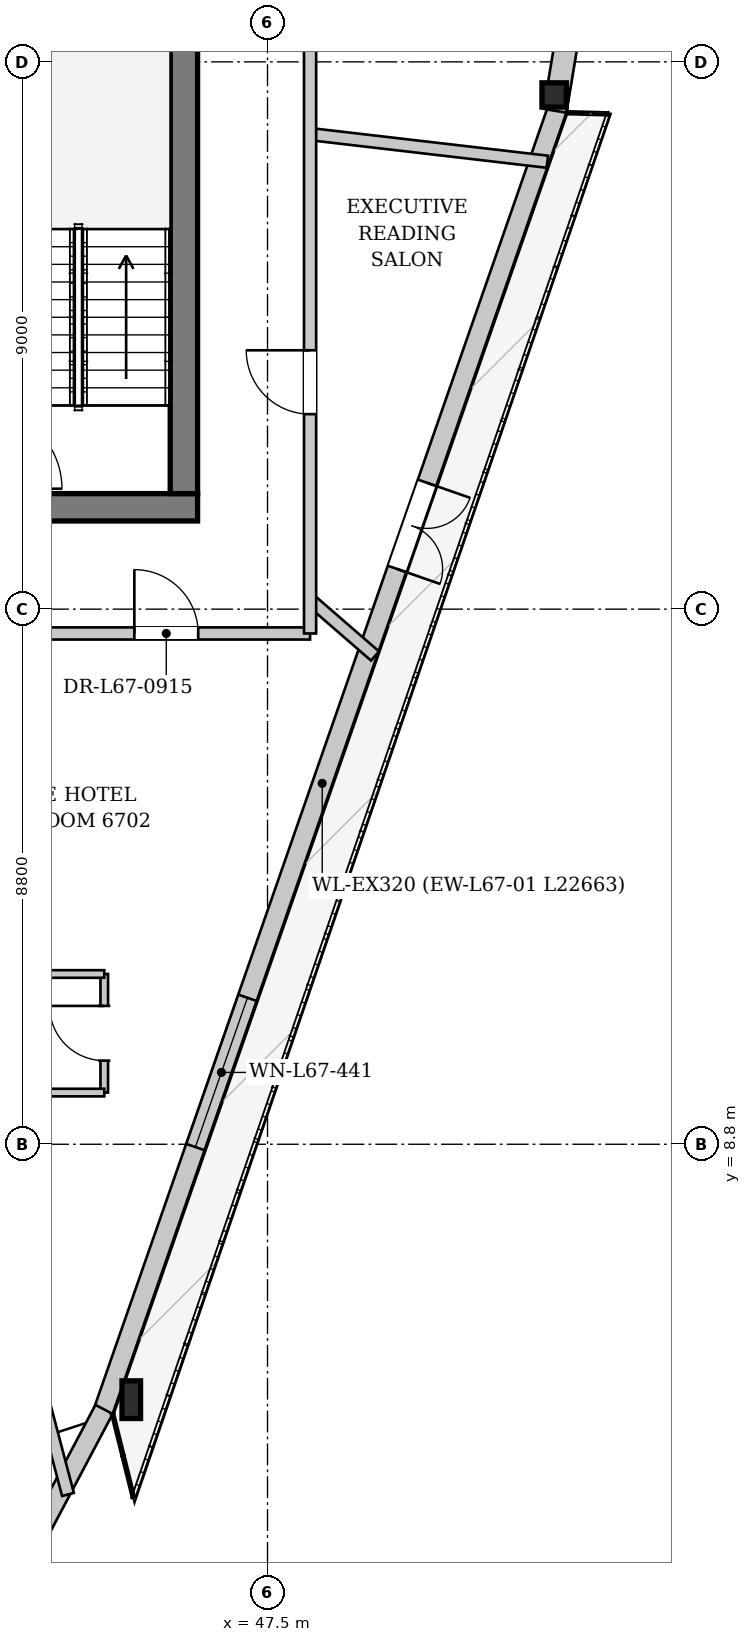
"""IFC4 building model, lengths in metres.
Left out: names, types, materials, properties, quantities, classifications, styles, units other than length and angle.
Written with IfcOpenShell. Run it as: python <this file> out.ifc"""

import sys

from ifc_helpers import new_model, si_unit, direction, frame, frame_2d, origin, origin_2d, place, context, subcontext, project, spatial, rectangle, i_section, extrude, source, transform, mapped, element, fill, save


model = new_model("IFC4")
c1 = context("Model", 3, precision=1e-05, world=origin(), true_north=direction((0.0, 1.0)))
c2 = subcontext(c1, "Body", "Model", "MODEL_VIEW")
j1 = project(units=[si_unit("LENGTHUNIT", "METRE"), si_unit("PLANEANGLEUNIT", "RADIAN")], contexts=[c1])
p1 = place(None, origin())
s1 = spatial("IfcSite", under=j1, at=p1, CompositionType="ELEMENT")
p2 = place(p1, origin())
s2 = spatial("IfcBuilding", under=s1, at=p2, CompositionType="ELEMENT")
p3 = place(p2, frame((0.0, 0.0, 252.5)))
s3 = spatial("IfcBuildingStorey", under=s2, at=p3, CompositionType="ELEMENT", Elevation=252.5)
m1 = source(origin(), c2, "Body", "SweptSolid", [
    extrude(i_section(OverallWidth=0.305, OverallDepth=0.62, WebThickness=0.021, FlangeThickness=0.04, at=origin_2d()), origin(), (0.0, 0.0, 1.0), 3.521),
])
p4 = place(p3, frame((44.953, 4.365, 0.0), z_axis=(0.174187178706, 0.133344723189, 0.975642358435), x_axis=(-0.607860680587, 0.794043697158, 0.0)))
e1 = element("IfcColumn", 1, at=p4, inside=s3, PredefinedType="COLUMN", context=c2, shape_type="MappedRepresentation", body=[
    mapped(m1, transform((0.0, 0.0, 0.0), x_axis=(1.0, 0.0, 0.0), y_axis=(0.0, 1.0, 0.0), z_axis=(0.0, 0.0, 1.0), scale=1.0)),
])
m2 = source(origin(), c2, "Body", "SweptSolid", [
    extrude(i_section(OverallWidth=0.401, OverallDepth=0.399, WebThickness=0.022, FlangeThickness=0.034, at=origin_2d()), origin(), (0.0, 0.0, 1.0), 3.507),
])
p5 = place(p3, frame((52.416, 25.764, 0.0), z_axis=(-0.11464621978, 0.166226577313, 0.97940031105), x_axis=(-0.823196118905, -0.56775712221, 0.0)))
e2 = element("IfcColumn", 2, at=p5, inside=s3, PredefinedType="COLUMN", context=c2, shape_type="MappedRepresentation", body=[
    mapped(m2, transform((0.0, 0.0, 0.0), x_axis=(1.0, 0.0, 0.0), y_axis=(0.0, 1.0, 0.0), z_axis=(0.0, 0.0, 1.0), scale=1.0)),
])
p6 = place(p3, frame((52.264, 25.817, 0.0), z_axis=(0.0, 0.0, 1.0), x_axis=(-0.329283040193, -0.944231263749, 0.0)))
e3 = element("IfcWall", 3, at=p6, inside=s3, PredefinedType="SOLIDWALL", context=c2, shape_type="SweptSolid", body=[
    extrude(rectangle(XDim=22.663, YDim=0.32, at=frame_2d((11.332, 0.0))), origin(), (0.0, 0.0, 1.0), 2.872),
])
p7 = place(p6, frame((6.502, 0.0, 0.0)))
e4 = element("IfcOpeningElement", 4, at=p7, cuts=e3, PredefinedType="OPENING", context=c2, shape_type="SweptSolid", body=[
    extrude(rectangle(XDim=1.5, YDim=2.3, at=frame_2d((0.75, 1.15))), frame((0.0, 0.17, 0.0), z_axis=(0.0, -1.0, 0.0), x_axis=(1.0, 0.0, 0.0)), (0.0, 0.0, 1.0), 0.34),
])
p8 = place(p6, frame((15.471, 0.0, 0.402)))
e5 = element("IfcOpeningElement", 5, at=p8, cuts=e3, PredefinedType="OPENING", context=c2, shape_type="SweptSolid", body=[
    extrude(rectangle(XDim=2.6, YDim=2.35, at=frame_2d((1.3, 1.175))), frame((0.0, 0.17, 0.0), z_axis=(0.0, -1.0, 0.0), x_axis=(1.0, 0.0, 0.0)), (0.0, 0.0, 1.0), 0.34),
])
p9 = place(p3, frame((44.812, 4.44, 0.0), z_axis=(0.0, 0.0, 1.0), x_axis=(-0.467628956956, -0.883924860277, 0.0)))
e6 = element("IfcWall", 6, at=p9, inside=s3, PredefinedType="SOLIDWALL", context=c2, shape_type="SweptSolid", body=[
    extrude(rectangle(XDim=3.382, YDim=0.32, at=frame_2d((1.691, 0.0))), origin(), (0.0, 0.0, 1.0), 2.872),
])
p10 = place(p3, frame((55.959, 48.15, 0.0), z_axis=(0.0, 0.0, 1.0), x_axis=(-0.164634811141, -0.986354590885, 0.0)))
e7 = element("IfcWall", 7, at=p10, inside=s3, PredefinedType="SOLIDWALL", context=c2, shape_type="SweptSolid", body=[
    extrude(rectangle(XDim=22.664, YDim=0.38, at=frame_2d((11.332, 0.0))), origin(), (0.0, 0.0, 1.0), 2.872),
])
p11 = place(p10, frame((5.746, 0.0, 0.65)))
e8 = element("IfcOpeningElement", 8, at=p11, cuts=e7, PredefinedType="OPENING", context=c2, shape_type="SweptSolid", body=[
    extrude(rectangle(XDim=1.2, YDim=1.5, at=frame_2d((0.6, 0.75))), frame((0.0, 0.2, 0.0), z_axis=(0.0, -1.0, 0.0), x_axis=(1.0, 0.0, 0.0)), (0.0, 0.0, 1.0), 0.4),
])
p12 = place(p10, frame((15.718, 0.0, 0.65)))
e9 = element("IfcOpeningElement", 9, at=p12, cuts=e7, PredefinedType="OPENING", context=c2, shape_type="SweptSolid", body=[
    extrude(rectangle(XDim=1.2, YDim=1.5, at=frame_2d((0.6, 0.75))), frame((0.0, 0.2, 0.0), z_axis=(0.0, -1.0, 0.0), x_axis=(1.0, 0.0, 0.0)), (0.0, 0.0, 1.0), 0.4),
])
p13 = place(p3, frame((46.35, 19.275, 0.0), z_axis=(0.0, 0.0, 1.0), x_axis=(-1.0, 0.0, 0.0)))
e10 = element("IfcWall", 10, at=p13, inside=s3, PredefinedType="SHEAR", context=c2, shape_type="SweptSolid", body=[
    extrude(rectangle(XDim=16.7, YDim=0.45, at=frame_2d((8.35, 0.0))), origin(), (0.0, 0.0, 1.0), 3.38),
])
p14 = place(p13, frame((4.55, 0.0, 0.0)))
e11 = element("IfcOpeningElement", 11, at=p14, cuts=e10, PredefinedType="OPENING", context=c2, shape_type="SweptSolid", body=[
    extrude(rectangle(XDim=1.12, YDim=2.25, at=frame_2d((0.56, 1.125))), frame((0.0, 0.235, 0.0), z_axis=(0.0, -1.0, 0.0), x_axis=(1.0, 0.0, 0.0)), (0.0, 0.0, 1.0), 0.47),
])
p15 = place(p13, frame((11.05, 0.0, 0.0)))
e12 = element("IfcOpeningElement", 12, at=p15, cuts=e10, PredefinedType="OPENING", context=c2, shape_type="SweptSolid", body=[
    extrude(rectangle(XDim=1.12, YDim=2.25, at=frame_2d((0.56, 1.125))), frame((0.0, 0.235, 0.0), z_axis=(0.0, -1.0, 0.0), x_axis=(1.0, 0.0, 0.0)), (0.0, 0.0, 1.0), 0.47),
])
p16 = place(p3, frame((46.125, 33.7, 0.0), z_axis=(0.0, 0.0, 1.0), x_axis=(0.0, -1.0, 0.0)))
e13 = element("IfcWall", 13, at=p16, inside=s3, PredefinedType="SHEAR", context=c2, shape_type="SweptSolid", body=[
    extrude(rectangle(XDim=14.2, YDim=0.45, at=frame_2d((7.1, 0.0))), origin(), (0.0, 0.0, 1.0), 3.38),
])
p17 = place(p16, frame((5.18, 0.0, 0.0)))
e14 = element("IfcOpeningElement", 14, at=p17, cuts=e13, PredefinedType="OPENING", context=c2, shape_type="SweptSolid", body=[
    extrude(rectangle(XDim=1.6, YDim=2.2, at=frame_2d((0.8, 1.1))), frame((0.0, 0.235, 0.0), z_axis=(0.0, -1.0, 0.0), x_axis=(1.0, 0.0, 0.0)), (0.0, 0.0, 1.0), 0.47),
])
p18 = place(p16, frame((2.05, 0.0, 0.0)))
e15 = element("IfcOpeningElement", 15, at=p18, cuts=e13, PredefinedType="OPENING", context=c2, shape_type="SweptSolid", body=[
    extrude(rectangle(XDim=0.95, YDim=2.1, at=frame_2d((0.475, 1.05))), frame((0.0, 0.235, 0.0), z_axis=(0.0, -1.0, 0.0), x_axis=(1.0, 0.0, 0.0)), (0.0, 0.0, 1.0), 0.47),
])
p19 = place(p3, frame((40.481, 17.2, 0.0), z_axis=(0.0, 0.0, 1.0), x_axis=(0.255204698794, -0.96688704703, 0.0)))
e16 = element("IfcWall", 16, at=p19, inside=s3, PredefinedType="PARTITIONING", context=c2, shape_type="SweptSolid", body=[
    extrude(rectangle(XDim=14.644, YDim=0.2, at=frame_2d((7.322, 0.0))), origin(), (0.0, 0.0, 1.0), 3.38),
])
p20 = place(p3, frame((48.2, 17.756, 0.0), z_axis=(0.0, 0.0, 1.0), x_axis=(0.755500982585, -0.655147514162, 0.0)))
e17 = element("IfcWall", 17, at=p20, inside=s3, PredefinedType="PARTITIONING", context=c2, shape_type="SweptSolid", body=[
    extrude(rectangle(XDim=1.414, YDim=0.2, at=frame_2d((0.707, 0.0))), origin(), (0.0, 0.0, 1.0), 3.38),
])
p21 = place(p3, frame((48.2, 25.412, 0.0), z_axis=(0.0, 0.0, 1.0), x_axis=(0.993283151491, -0.115709035791, 0.0)))
e18 = element("IfcWall", 18, at=p21, inside=s3, PredefinedType="PARTITIONING", context=c2, shape_type="SweptSolid", body=[
    extrude(rectangle(XDim=3.929, YDim=0.2, at=frame_2d((1.964, 0.0))), origin(), (0.0, 0.0, 1.0), 3.38),
])
p22 = place(p3, frame((44.815, 9.65, 0.0), z_axis=(0.0, 0.0, 1.0), x_axis=(0.0, 1.0, 0.0)))
e19 = element("IfcWall", 19, at=p22, inside=s3, PredefinedType="PARTITIONING", context=c2, shape_type="SweptSolid", body=[
    extrude(rectangle(XDim=1.95, YDim=0.125, at=frame_2d((0.975, 0.0))), origin(), (0.0, 0.0, 1.0), 3.38),
])
p23 = place(p22, frame((0.525, 0.0, 0.0)))
e20 = element("IfcOpeningElement", 20, at=p23, cuts=e19, PredefinedType="OPENING", context=c2, shape_type="SweptSolid", body=[
    extrude(rectangle(XDim=0.9, YDim=2.1, at=frame_2d((0.45, 1.05))), frame((0.0, 0.073, 0.0), z_axis=(0.0, -1.0, 0.0), x_axis=(1.0, 0.0, 0.0)), (0.0, 0.0, 1.0), 0.145),
])
for number, where, z_axis, x_axis in (
    (21, (44.815, 11.6, 0.0), (0.0, 0.0, 1.0), (-1.0, 0.0, 0.0)),
    (22, (42.715, 9.65, 0.0), (0.0, 0.0, 1.0), (1.0, 0.0, 0.0)),
):
    element("IfcWall", number, at=place(p3, frame(where, z_axis=z_axis, x_axis=x_axis)), inside=s3, PredefinedType="PARTITIONING", context=c2, shape_type="SweptSolid", body=[
        extrude(rectangle(XDim=2.1, YDim=0.125, at=frame_2d((1.05, 0.0))), origin(), (0.0, 0.0, 1.0), 3.38),
    ])
p24 = place(p3, frame((27.8, 17.2, 0.0), z_axis=(0.0, 0.0, 1.0), x_axis=(1.0, 0.0, 0.0)))
e23 = element("IfcWall", 23, at=p24, inside=s3, PredefinedType="PARTITIONING", context=c2, shape_type="SweptSolid", body=[
    extrude(rectangle(XDim=20.4, YDim=0.2, at=frame_2d((10.2, 0.0))), origin(), (0.0, 0.0, 1.0), 3.38),
])
p25 = place(p24, frame((9.356, 0.0, 0.0)))
e24 = element("IfcOpeningElement", 24, at=p25, cuts=e23, PredefinedType="OPENING", context=c2, shape_type="SweptSolid", body=[
    extrude(rectangle(XDim=1.05, YDim=2.2, at=frame_2d((0.525, 1.1))), frame((0.0, 0.11, 0.0), z_axis=(0.0, -1.0, 0.0), x_axis=(1.0, 0.0, 0.0)), (0.0, 0.0, 1.0), 0.22),
])
p26 = place(p24, frame((17.51, 0.0, 0.0)))
e25 = element("IfcOpeningElement", 25, at=p26, cuts=e23, PredefinedType="OPENING", context=c2, shape_type="SweptSolid", body=[
    extrude(rectangle(XDim=1.05, YDim=2.2, at=frame_2d((0.525, 1.1))), frame((0.0, 0.11, 0.0), z_axis=(0.0, -1.0, 0.0), x_axis=(1.0, 0.0, 0.0)), (0.0, 0.0, 1.0), 0.22),
])
p27 = place(p24, frame((0.412, 0.0, 0.0)))
e26 = element("IfcOpeningElement", 26, at=p27, cuts=e23, PredefinedType="OPENING", context=c2, shape_type="SweptSolid", body=[
    extrude(rectangle(XDim=1.05, YDim=2.2, at=frame_2d((0.525, 1.1))), frame((0.0, 0.11, 0.0), z_axis=(0.0, -1.0, 0.0), x_axis=(1.0, 0.0, 0.0)), (0.0, 0.0, 1.0), 0.22),
])
p28 = place(p3, frame((48.2, 17.2, 0.0), z_axis=(0.0, 0.0, 1.0), x_axis=(0.0, 1.0, 0.0)))
e27 = element("IfcWall", 27, at=p28, inside=s3, PredefinedType="PARTITIONING", context=c2, shape_type="SweptSolid", body=[
    extrude(rectangle(XDim=18.8, YDim=0.2, at=frame_2d((9.4, 0.0))), origin(), (0.0, 0.0, 1.0), 3.065),
])
p29 = place(p28, frame((3.607, 0.0, 0.0)))
e28 = element("IfcOpeningElement", 28, at=p29, cuts=e27, PredefinedType="OPENING", context=c2, shape_type="SweptSolid", body=[
    extrude(rectangle(XDim=1.05, YDim=2.2, at=frame_2d((0.525, 1.1))), frame((0.0, 0.11, 0.0), z_axis=(0.0, -1.0, 0.0), x_axis=(1.0, 0.0, 0.0)), (0.0, 0.0, 1.0), 0.22),
])
p30 = place(p28, frame((10.359, 0.0, 0.0)))
e29 = element("IfcOpeningElement", 29, at=p30, cuts=e27, PredefinedType="OPENING", context=c2, shape_type="SweptSolid", body=[
    extrude(rectangle(XDim=1.05, YDim=2.2, at=frame_2d((0.525, 1.1))), frame((0.0, 0.11, 0.0), z_axis=(0.0, -1.0, 0.0), x_axis=(1.0, 0.0, 0.0)), (0.0, 0.0, 1.0), 0.22),
])
m3 = source(origin(), c2, "Body", "SweptSolid", [
    extrude(rectangle(XDim=1.5, YDim=2.3, at=frame_2d((0.75, 1.15))), frame((0.0, 0.025, 0.0), z_axis=(0.0, -1.0, 0.0), x_axis=(1.0, 0.0, 0.0)), (0.0, 0.0, 1.0), 0.05),
])
p31 = place(p7, origin())
e30 = element("IfcDoor", 30, at=p31, inside=s3, OperationType="DOUBLE_DOOR_SINGLE_SWING", PredefinedType="DOOR", context=c2, shape_type="MappedRepresentation", body=[
    mapped(m3, transform((0.0, 0.0, 0.0), x_axis=(1.0, 0.0, 0.0), y_axis=(0.0, 1.0, 0.0), z_axis=(0.0, 0.0, 1.0), scale=1.0)),
])
fill(e4, e30)
m4 = source(origin(), c2, "Body", "SweptSolid", [
    extrude(rectangle(XDim=2.6, YDim=2.35, at=frame_2d((1.3, 1.175))), frame((0.0, 0.03, 0.0), z_axis=(0.0, -1.0, 0.0), x_axis=(1.0, 0.0, 0.0)), (0.0, 0.0, 1.0), 0.06),
])
p32 = place(p8, origin())
e31 = element("IfcWindow", 31, at=p32, inside=s3, PartitioningType="SINGLE_PANEL", PredefinedType="WINDOW", context=c2, shape_type="MappedRepresentation", body=[
    mapped(m4, transform((0.0, 0.0, 0.0), x_axis=(1.0, 0.0, 0.0), y_axis=(0.0, 1.0, 0.0), z_axis=(0.0, 0.0, 1.0), scale=1.0)),
])
fill(e5, e31)
m5 = source(origin(), c2, "Body", "SweptSolid", [
    extrude(rectangle(XDim=0.9, YDim=2.1, at=frame_2d((0.45, 1.05))), frame((0.0, 0.025, 0.0), z_axis=(0.0, -1.0, 0.0), x_axis=(1.0, 0.0, 0.0)), (0.0, 0.0, 1.0), 0.05),
])
p33 = place(p23, origin())
e32 = element("IfcDoor", 32, at=p33, inside=s3, OperationType="SINGLE_SWING_RIGHT", PredefinedType="DOOR", context=c2, shape_type="MappedRepresentation", body=[
    mapped(m5, transform((0.0, 0.0, 0.0), x_axis=(1.0, 0.0, 0.0), y_axis=(0.0, 1.0, 0.0), z_axis=(0.0, 0.0, 1.0), scale=1.0)),
])
fill(e20, e32)
m6 = source(origin(), c2, "Body", "SweptSolid", [
    extrude(rectangle(XDim=1.05, YDim=2.2, at=frame_2d((0.525, 1.1))), frame((0.0, 0.025, 0.0), z_axis=(0.0, -1.0, 0.0), x_axis=(1.0, 0.0, 0.0)), (0.0, 0.0, 1.0), 0.05),
])
p34 = place(p26, origin())
e33 = element("IfcDoor", 33, at=p34, inside=s3, OperationType="SINGLE_SWING_LEFT", PredefinedType="DOOR", context=c2, shape_type="MappedRepresentation", body=[
    mapped(m6, transform((0.0, 0.0, 0.0), x_axis=(1.0, 0.0, 0.0), y_axis=(0.0, 1.0, 0.0), z_axis=(0.0, 0.0, 1.0), scale=1.0)),
])
fill(e25, e33)
p35 = place(p29, origin())
e34 = element("IfcDoor", 34, at=p35, inside=s3, OperationType="SINGLE_SWING_RIGHT", PredefinedType="DOOR", context=c2, shape_type="MappedRepresentation", body=[
    mapped(m6, transform((0.0, 0.0, 0.0), x_axis=(1.0, 0.0, 0.0), y_axis=(0.0, 1.0, 0.0), z_axis=(0.0, 0.0, 1.0), scale=1.0)),
])
fill(e28, e34)
save(model, sys.argv[1])
